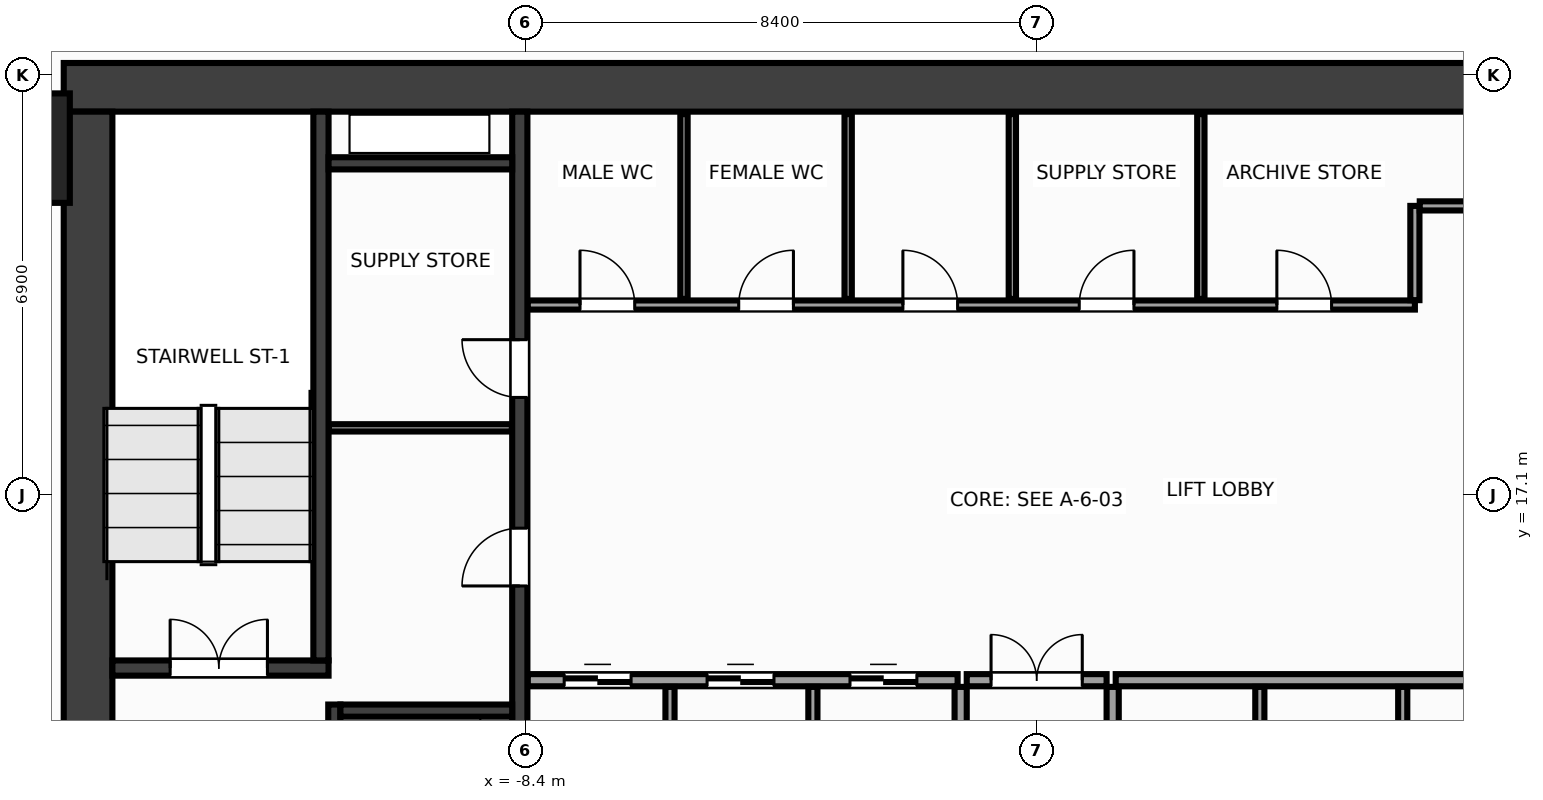
"""IFC4 building model, lengths in metres.
Left out: names, types, materials, properties, quantities, classifications, styles, units other than length and angle.
Written with IfcOpenShell. Run it as: python <this file> out.ifc"""

import sys

from ifc_helpers import new_model, si_unit, direction, frame, frame_2d, origin, origin_2d, place, context, subcontext, project, spatial, rectangle, extrude, source, transform, mapped, element, fill, save


model = new_model("IFC4")
c1 = context("Model", 3, precision=1e-05, world=origin(), true_north=direction((0.0, 1.0)))
c2 = subcontext(c1, "Body", "Model", "MODEL_VIEW")
j1 = project(units=[si_unit("LENGTHUNIT", "METRE"), si_unit("PLANEANGLEUNIT", "RADIAN")], contexts=[c1])
p1 = place(None, origin())
s1 = spatial("IfcSite", under=j1, at=p1, CompositionType="ELEMENT")
p2 = place(p1, origin())
s2 = spatial("IfcBuilding", under=s1, at=p2, CompositionType="ELEMENT")
p3 = place(p2, frame((0.0, 0.0, 56.0)))
s3 = spatial("IfcBuildingStorey", under=s2, at=p3, CompositionType="ELEMENT", Elevation=56.0)
m1 = source(origin(), c2, "Body", "SweptSolid", [
    extrude(rectangle(XDim=32.0, YDim=0.8, at=frame_2d((16.0, 0.0))), origin(), (0.0, 0.0, 1.0), 3.6),
])
p4 = place(p3, frame((-16.0, 23.8, 0.0), z_axis=(0.0, 0.0, 1.0), x_axis=(1.0, 0.0, 0.0)))
e1 = element("IfcWall", 1, at=p4, inside=s3, PredefinedType="SHEAR", context=c2, shape_type="MappedRepresentation", body=[
    mapped(m1, transform((0.0, 0.0, 0.0), x_axis=(1.0, 0.0, 0.0), y_axis=(0.0, 1.0, 0.0), z_axis=(0.0, 0.0, 1.0), scale=1.0)),
])
m2 = source(origin(), c2, "Body", "SweptSolid", [
    extrude(rectangle(XDim=12.8, YDim=0.8, at=frame_2d((6.4, 0.0))), origin(), (0.0, 0.0, 1.0), 3.6),
])
p5 = place(p3, frame((-15.6, 10.6, 0.0), z_axis=(0.0, 0.0, 1.0), x_axis=(0.0, 1.0, 0.0)))
e2 = element("IfcWall", 2, at=p5, inside=s3, PredefinedType="SHEAR", context=c2, shape_type="MappedRepresentation", body=[
    mapped(m2, transform((0.0, 0.0, 0.0), x_axis=(1.0, 0.0, 0.0), y_axis=(0.0, 1.0, 0.0), z_axis=(0.0, 0.0, 1.0), scale=1.0)),
])
m3 = source(origin(), c2, "Body", "SweptSolid", [
    extrude(rectangle(XDim=12.8, YDim=0.25, at=frame_2d((6.4, 0.0))), origin(), (0.0, 0.0, 1.0), 3.6),
])
p6 = place(p3, frame((-8.5, 10.6, 0.0), z_axis=(0.0, 0.0, 1.0), x_axis=(0.0, 1.0, 0.0)))
e3 = element("IfcWall", 3, at=p6, inside=s3, PredefinedType="SHEAR", context=c2, shape_type="MappedRepresentation", body=[
    mapped(m3, transform((0.0, 0.0, 0.0), x_axis=(1.0, 0.0, 0.0), y_axis=(0.0, 1.0, 0.0), z_axis=(0.0, 0.0, 1.0), scale=1.0)),
])
p7 = place(p6, frame((5.0, 0.0, 0.0)))
e4 = element("IfcOpeningElement", 4, at=p7, cuts=e3, PredefinedType="OPENING", context=c2, shape_type="SweptSolid", body=[
    extrude(rectangle(XDim=0.95, YDim=2.15, at=frame_2d((0.475, 1.075))), frame((0.0, 0.137, 0.0), z_axis=(0.0, -1.0, 0.0), x_axis=(1.0, 0.0, 0.0)), (0.0, 0.0, 1.0), 0.274),
])
p8 = place(p6, frame((8.1, 0.0, 0.0)))
e5 = element("IfcOpeningElement", 5, at=p8, cuts=e3, PredefinedType="OPENING", context=c2, shape_type="SweptSolid", body=[
    extrude(rectangle(XDim=0.95, YDim=2.15, at=frame_2d((0.475, 1.075))), frame((0.0, 0.137, 0.0), z_axis=(0.0, -1.0, 0.0), x_axis=(1.0, 0.0, 0.0)), (0.0, 0.0, 1.0), 0.274),
])
m4 = source(origin(), c2, "Body", "SweptSolid", [
    extrude(rectangle(XDim=3.555, YDim=0.25, at=frame_2d((1.777, 0.0))), origin(), (0.0, 0.0, 1.0), 3.6),
])
p9 = place(p3, frame((-15.2, 14.25, 0.0), z_axis=(0.0, 0.0, 1.0), x_axis=(1.0, 0.0, 0.0)))
e6 = element("IfcWall", 6, at=p9, inside=s3, PredefinedType="SHEAR", context=c2, shape_type="MappedRepresentation", body=[
    mapped(m4, transform((0.0, 0.0, 0.0), x_axis=(1.0, 0.0, 0.0), y_axis=(0.0, 1.0, 0.0), z_axis=(0.0, 0.0, 1.0), scale=1.0)),
])
p10 = place(p9, frame((0.95, 0.0, 0.0)))
e7 = element("IfcOpeningElement", 7, at=p10, cuts=e6, PredefinedType="OPENING", context=c2, shape_type="SweptSolid", body=[
    extrude(rectangle(XDim=1.6, YDim=2.15, at=frame_2d((0.8, 1.075))), frame((0.0, 0.137, 0.0), z_axis=(0.0, -1.0, 0.0), x_axis=(1.0, 0.0, 0.0)), (0.0, 0.0, 1.0), 0.274),
])
m5 = source(origin(), c2, "Body", "SweptSolid", [
    extrude(rectangle(XDim=9.025, YDim=0.25, at=frame_2d((4.512, 0.0))), origin(), (0.0, 0.0, 1.0), 3.6),
])
p11 = place(p3, frame((-11.77, 14.375, 0.0), z_axis=(0.0, 0.0, 1.0), x_axis=(0.0, 1.0, 0.0)))
e8 = element("IfcWall", 8, at=p11, inside=s3, PredefinedType="SHEAR", context=c2, shape_type="MappedRepresentation", body=[
    mapped(m5, transform((0.0, 0.0, 0.0), x_axis=(1.0, 0.0, 0.0), y_axis=(0.0, 1.0, 0.0), z_axis=(0.0, 0.0, 1.0), scale=1.0)),
])
m6 = source(origin(), c2, "Body", "SweptSolid", [
    extrude(rectangle(XDim=3.05, YDim=0.2, at=frame_2d((1.525, 0.0))), origin(), (0.0, 0.0, 1.0), 3.6),
])
p12 = place(p3, frame((-11.55, 10.6, 0.0), z_axis=(0.0, 0.0, 1.0), x_axis=(0.0, 1.0, 0.0)))
e9 = element("IfcWall", 9, at=p12, inside=s3, PredefinedType="SHEAR", context=c2, shape_type="MappedRepresentation", body=[
    mapped(m6, transform((0.0, 0.0, 0.0), x_axis=(1.0, 0.0, 0.0), y_axis=(0.0, 1.0, 0.0), z_axis=(0.0, 0.0, 1.0), scale=1.0)),
])
p13 = place(p12, frame((0.9, 0.0, 0.0)))
e10 = element("IfcOpeningElement", 10, at=p13, cuts=e9, PredefinedType="OPENING", context=c2, shape_type="SweptSolid", body=[
    extrude(rectangle(XDim=1.1, YDim=2.15, at=frame_2d((0.55, 1.075))), frame((0.0, 0.112, 0.0), z_axis=(0.0, -1.0, 0.0), x_axis=(1.0, 0.0, 0.0)), (0.0, 0.0, 1.0), 0.224),
])
m7 = source(origin(), c2, "Body", "SweptSolid", [
    extrude(rectangle(XDim=2.825, YDim=0.2, at=frame_2d((1.413, 0.0))), origin(), (0.0, 0.0, 1.0), 3.6),
])
p14 = place(p3, frame((-11.45, 13.55, 0.0), z_axis=(0.0, 0.0, 1.0), x_axis=(1.0, 0.0, 0.0)))
e11 = element("IfcWall", 11, at=p14, inside=s3, PredefinedType="SHEAR", context=c2, shape_type="MappedRepresentation", body=[
    mapped(m7, transform((0.0, 0.0, 0.0), x_axis=(1.0, 0.0, 0.0), y_axis=(0.0, 1.0, 0.0), z_axis=(0.0, 0.0, 1.0), scale=1.0)),
])
m8 = source(origin(), c2, "Body", "SweptSolid", [
    extrude(rectangle(XDim=3.02, YDim=0.2, at=frame_2d((1.51, 0.0))), origin(), (0.0, 0.0, 1.0), 3.6),
])
p15 = place(p3, frame((-11.645, 22.55, 0.0), z_axis=(0.0, 0.0, 1.0), x_axis=(1.0, 0.0, 0.0)))
e12 = element("IfcWall", 12, at=p15, inside=s3, PredefinedType="SHEAR", context=c2, shape_type="MappedRepresentation", body=[
    mapped(m8, transform((0.0, 0.0, 0.0), x_axis=(1.0, 0.0, 0.0), y_axis=(0.0, 1.0, 0.0), z_axis=(0.0, 0.0, 1.0), scale=1.0)),
])
m9 = source(origin(), c2, "Body", "SweptSolid", [
    extrude(rectangle(XDim=1.8, YDim=1.8, at=origin_2d()), origin(), (0.0, 0.0, 1.0), 3.6),
])
p16 = place(p3, frame((-16.8, 22.8, 0.0), z_axis=(0.0, 0.0, 1.0), x_axis=(1.0, 0.0, 0.0)))
e13 = element("IfcColumn", 13, at=p16, inside=s3, PredefinedType="COLUMN", context=c2, shape_type="MappedRepresentation", body=[
    mapped(m9, transform((0.0, 0.0, 0.0), x_axis=(1.0, 0.0, 0.0), y_axis=(0.0, 1.0, 0.0), z_axis=(0.0, 0.0, 1.0), scale=1.0)),
])
m10 = source(origin(), c2, "Body", "SweptSolid", [
    extrude(rectangle(XDim=3.01, YDim=0.12, at=frame_2d((1.505, 0.0))), origin(), (0.0, 0.0, 1.0), 3.36),
])
p17 = place(p3, frame((-11.64, 18.2, 0.0), z_axis=(0.0, 0.0, 1.0), x_axis=(1.0, 0.0, 0.0)))
e14 = element("IfcWall", 14, at=p17, inside=s3, PredefinedType="PARTITIONING", context=c2, shape_type="MappedRepresentation", body=[
    mapped(m10, transform((0.0, 0.0, 0.0), x_axis=(1.0, 0.0, 0.0), y_axis=(0.0, 1.0, 0.0), z_axis=(0.0, 0.0, 1.0), scale=1.0)),
])
m11 = source(origin(), c2, "Body", "SweptSolid", [
    extrude(rectangle(XDim=7.07, YDim=0.2, at=frame_2d((3.535, 0.0))), origin(), (0.0, 0.0, 1.0), 3.36),
])
p18 = place(p3, frame((-8.37, 14.05, 0.0), z_axis=(0.0, 0.0, 1.0), x_axis=(1.0, 0.0, 0.0)))
e15 = element("IfcWall", 15, at=p18, inside=s3, PredefinedType="PARTITIONING", context=c2, shape_type="MappedRepresentation", body=[
    mapped(m11, transform((0.0, 0.0, 0.0), x_axis=(1.0, 0.0, 0.0), y_axis=(0.0, 1.0, 0.0), z_axis=(0.0, 0.0, 1.0), scale=1.0)),
])
p19 = place(p18, frame((0.6, 0.0, 0.0)))
e16 = element("IfcOpeningElement", 16, at=p19, cuts=e15, PredefinedType="OPENING", context=c2, shape_type="SweptSolid", body=[
    extrude(rectangle(XDim=1.1, YDim=2.15, at=frame_2d((0.55, 1.075))), frame((0.0, 0.112, 0.0), z_axis=(0.0, -1.0, 0.0), x_axis=(1.0, 0.0, 0.0)), (0.0, 0.0, 1.0), 0.224),
])
p20 = place(p18, frame((2.95, 0.0, 0.0)))
e17 = element("IfcOpeningElement", 17, at=p20, cuts=e15, PredefinedType="OPENING", context=c2, shape_type="SweptSolid", body=[
    extrude(rectangle(XDim=1.1, YDim=2.15, at=frame_2d((0.55, 1.075))), frame((0.0, 0.112, 0.0), z_axis=(0.0, -1.0, 0.0), x_axis=(1.0, 0.0, 0.0)), (0.0, 0.0, 1.0), 0.224),
])
p21 = place(p18, frame((5.3, 0.0, 0.0)))
e18 = element("IfcOpeningElement", 18, at=p21, cuts=e15, PredefinedType="OPENING", context=c2, shape_type="SweptSolid", body=[
    extrude(rectangle(XDim=1.1, YDim=2.15, at=frame_2d((0.55, 1.075))), frame((0.0, 0.112, 0.0), z_axis=(0.0, -1.0, 0.0), x_axis=(1.0, 0.0, 0.0)), (0.0, 0.0, 1.0), 0.224),
])
p22 = place(p3, frame((1.3, 14.05, 0.0), z_axis=(0.0, 0.0, 1.0), x_axis=(1.0, 0.0, 0.0)))
e19 = element("IfcWall", 19, at=p22, inside=s3, PredefinedType="PARTITIONING", context=c2, shape_type="MappedRepresentation", body=[
    mapped(m11, transform((0.0, 0.0, 0.0), x_axis=(1.0, 0.0, 0.0), y_axis=(0.0, 1.0, 0.0), z_axis=(0.0, 0.0, 1.0), scale=1.0)),
])
m12 = source(origin(), c2, "Body", "SweptSolid", [
    extrude(rectangle(XDim=3.34, YDim=0.2, at=frame_2d((1.67, 0.0))), origin(), (0.0, 0.0, 1.0), 3.36),
])
for number, where, z_axis, x_axis in (
    (20, (-1.25, 10.6, 0.0), (0.0, 0.0, 1.0), (0.0, 1.0, 0.0)),
    (21, (1.25, 10.6, 0.0), (0.0, 0.0, 1.0), (0.0, 1.0, 0.0)),
):
    element("IfcWall", number, at=place(p3, frame(where, z_axis=z_axis, x_axis=x_axis)), inside=s3, PredefinedType="PARTITIONING", context=c2, shape_type="MappedRepresentation", body=[
        mapped(m12, transform((0.0, 0.0, 0.0), x_axis=(1.0, 0.0, 0.0), y_axis=(0.0, 1.0, 0.0), z_axis=(0.0, 0.0, 1.0), scale=1.0)),
    ])
m13 = source(origin(), c2, "Body", "SweptSolid", [
    extrude(rectangle(XDim=2.3, YDim=0.2, at=frame_2d((1.15, 0.0))), origin(), (0.0, 0.0, 1.0), 3.36),
])
p23 = place(p3, frame((-1.15, 14.05, 0.0), z_axis=(0.0, 0.0, 1.0), x_axis=(1.0, 0.0, 0.0)))
e22 = element("IfcWall", 22, at=p23, inside=s3, PredefinedType="PARTITIONING", context=c2, shape_type="MappedRepresentation", body=[
    mapped(m13, transform((0.0, 0.0, 0.0), x_axis=(1.0, 0.0, 0.0), y_axis=(0.0, 1.0, 0.0), z_axis=(0.0, 0.0, 1.0), scale=1.0)),
])
p24 = place(p23, frame((0.4, 0.0, 0.0)))
e23 = element("IfcOpeningElement", 23, at=p24, cuts=e22, PredefinedType="OPENING", context=c2, shape_type="SweptSolid", body=[
    extrude(rectangle(XDim=1.5, YDim=2.2, at=frame_2d((0.75, 1.1))), frame((0.0, 0.112, 0.0), z_axis=(0.0, -1.0, 0.0), x_axis=(1.0, 0.0, 0.0)), (0.0, 0.0, 1.0), 0.224),
])
m14 = source(origin(), c2, "Body", "SweptSolid", [
    extrude(rectangle(XDim=14.59, YDim=0.15, at=frame_2d((7.295, 0.0))), origin(), (0.0, 0.0, 1.0), 3.36),
])
p25 = place(p3, frame((-8.37, 20.22, 0.0), z_axis=(0.0, 0.0, 1.0), x_axis=(1.0, 0.0, 0.0)))
e24 = element("IfcWall", 24, at=p25, inside=s3, PredefinedType="PARTITIONING", context=c2, shape_type="MappedRepresentation", body=[
    mapped(m14, transform((0.0, 0.0, 0.0), x_axis=(1.0, 0.0, 0.0), y_axis=(0.0, 1.0, 0.0), z_axis=(0.0, 0.0, 1.0), scale=1.0)),
])
p26 = place(p25, frame((0.86, 0.0, 0.0)))
e25 = element("IfcOpeningElement", 25, at=p26, cuts=e24, PredefinedType="OPENING", context=c2, shape_type="SweptSolid", body=[
    extrude(rectangle(XDim=0.9, YDim=2.15, at=frame_2d((0.45, 1.075))), frame((0.0, 0.087, 0.0), z_axis=(0.0, -1.0, 0.0), x_axis=(1.0, 0.0, 0.0)), (0.0, 0.0, 1.0), 0.174),
])
p27 = place(p25, frame((3.47, 0.0, 0.0)))
e26 = element("IfcOpeningElement", 26, at=p27, cuts=e24, PredefinedType="OPENING", context=c2, shape_type="SweptSolid", body=[
    extrude(rectangle(XDim=0.9, YDim=2.15, at=frame_2d((0.45, 1.075))), frame((0.0, 0.087, 0.0), z_axis=(0.0, -1.0, 0.0), x_axis=(1.0, 0.0, 0.0)), (0.0, 0.0, 1.0), 0.174),
])
p28 = place(p25, frame((6.17, 0.0, 0.0)))
e27 = element("IfcOpeningElement", 27, at=p28, cuts=e24, PredefinedType="OPENING", context=c2, shape_type="SweptSolid", body=[
    extrude(rectangle(XDim=0.9, YDim=2.15, at=frame_2d((0.45, 1.075))), frame((0.0, 0.087, 0.0), z_axis=(0.0, -1.0, 0.0), x_axis=(1.0, 0.0, 0.0)), (0.0, 0.0, 1.0), 0.174),
])
p29 = place(p25, frame((9.07, 0.0, 0.0)))
e28 = element("IfcOpeningElement", 28, at=p29, cuts=e24, PredefinedType="OPENING", context=c2, shape_type="SweptSolid", body=[
    extrude(rectangle(XDim=0.9, YDim=2.15, at=frame_2d((0.45, 1.075))), frame((0.0, 0.087, 0.0), z_axis=(0.0, -1.0, 0.0), x_axis=(1.0, 0.0, 0.0)), (0.0, 0.0, 1.0), 0.174),
])
p30 = place(p25, frame((12.32, 0.0, 0.0)))
e29 = element("IfcOpeningElement", 29, at=p30, cuts=e24, PredefinedType="OPENING", context=c2, shape_type="SweptSolid", body=[
    extrude(rectangle(XDim=0.9, YDim=2.15, at=frame_2d((0.45, 1.075))), frame((0.0, 0.087, 0.0), z_axis=(0.0, -1.0, 0.0), x_axis=(1.0, 0.0, 0.0)), (0.0, 0.0, 1.0), 0.174),
])
m15 = source(origin(), c2, "Body", "SweptSolid", [
    extrude(rectangle(XDim=1.55, YDim=0.15, at=frame_2d((0.775, 0.0))), origin(), (0.0, 0.0, 1.0), 3.36),
])
p31 = place(p3, frame((6.22, 20.3, 0.0), z_axis=(0.0, 0.0, 1.0), x_axis=(0.0, 1.0, 0.0)))
e30 = element("IfcWall", 30, at=p31, inside=s3, PredefinedType="PARTITIONING", context=c2, shape_type="MappedRepresentation", body=[
    mapped(m15, transform((0.0, 0.0, 0.0), x_axis=(1.0, 0.0, 0.0), y_axis=(0.0, 1.0, 0.0), z_axis=(0.0, 0.0, 1.0), scale=1.0)),
])
m16 = source(origin(), c2, "Body", "SweptSolid", [
    extrude(rectangle(XDim=2.07, YDim=0.15, at=frame_2d((1.035, 0.0))), origin(), (0.0, 0.0, 1.0), 3.36),
])
p32 = place(p3, frame((6.3, 21.85, 0.0), z_axis=(0.0, 0.0, 1.0), x_axis=(1.0, 0.0, 0.0)))
e31 = element("IfcWall", 31, at=p32, inside=s3, PredefinedType="PARTITIONING", context=c2, shape_type="MappedRepresentation", body=[
    mapped(m16, transform((0.0, 0.0, 0.0), x_axis=(1.0, 0.0, 0.0), y_axis=(0.0, 1.0, 0.0), z_axis=(0.0, 0.0, 1.0), scale=1.0)),
])
m17 = source(origin(), c2, "Body", "SweptSolid", [
    extrude(rectangle(XDim=3.34, YDim=0.15, at=frame_2d((1.67, 0.0))), origin(), (0.0, 0.0, 1.0), 3.36),
])
for number, where, z_axis, x_axis in (
    (32, (-6.03, 10.6, 0.0), (0.0, 0.0, 1.0), (0.0, 1.0, 0.0)),
    (33, (-3.68, 10.6, 0.0), (0.0, 0.0, 1.0), (0.0, 1.0, 0.0)),
    (34, (3.67, 10.6, 0.0), (0.0, 0.0, 1.0), (0.0, 1.0, 0.0)),
    (35, (6.02, 10.6, 0.0), (0.0, 0.0, 1.0), (0.0, 1.0, 0.0)),
):
    element("IfcWall", number, at=place(p3, frame(where, z_axis=z_axis, x_axis=x_axis)), inside=s3, PredefinedType="PARTITIONING", context=c2, shape_type="MappedRepresentation", body=[
        mapped(m17, transform((0.0, 0.0, 0.0), x_axis=(1.0, 0.0, 0.0), y_axis=(0.0, 1.0, 0.0), z_axis=(0.0, 0.0, 1.0), scale=1.0)),
    ])
m18 = source(origin(), c2, "Body", "SweptSolid", [
    extrude(rectangle(XDim=3.04, YDim=0.12, at=frame_2d((1.52, 0.0))), origin(), (0.0, 0.0, 1.0), 3.36),
])
for number, where, z_axis, x_axis in (
    (36, (-5.8, 20.32, 0.0), (0.0, 0.0, 1.0), (0.0, 1.0, 0.0)),
    (37, (-3.1, 20.32, 0.0), (0.0, 0.0, 1.0), (0.0, 1.0, 0.0)),
    (38, (-0.4, 20.32, 0.0), (0.0, 0.0, 1.0), (0.0, 1.0, 0.0)),
    (39, (2.7, 20.32, 0.0), (0.0, 0.0, 1.0), (0.0, 1.0, 0.0)),
):
    element("IfcWall", number, at=place(p3, frame(where, z_axis=z_axis, x_axis=x_axis)), inside=s3, PredefinedType="PARTITIONING", context=c2, shape_type="MappedRepresentation", body=[
        mapped(m18, transform((0.0, 0.0, 0.0), x_axis=(1.0, 0.0, 0.0), y_axis=(0.0, 1.0, 0.0), z_axis=(0.0, 0.0, 1.0), scale=1.0)),
    ])
m19 = source(origin(), c2, "Body", "SweptSolid", [
    extrude(rectangle(XDim=1.6, YDim=2.15, at=frame_2d((0.8, 1.075))), frame((0.0, 0.025, 0.0), z_axis=(0.0, -1.0, 0.0), x_axis=(1.0, 0.0, 0.0)), (0.0, 0.0, 1.0), 0.05),
])
p33 = place(p10, origin())
e40 = element("IfcDoor", 40, at=p33, inside=s3, OperationType="DOUBLE_DOOR_SINGLE_SWING", PredefinedType="DOOR", context=c2, shape_type="MappedRepresentation", body=[
    mapped(m19, transform((0.0, 0.0, 0.0), x_axis=(1.0, 0.0, 0.0), y_axis=(0.0, 1.0, 0.0), z_axis=(0.0, 0.0, 1.0), scale=1.0)),
])
fill(e7, e40)
m20 = source(origin(), c2, "Body", "SweptSolid", [
    extrude(rectangle(XDim=0.95, YDim=2.15, at=frame_2d((0.475, 1.075))), frame((0.0, 0.025, 0.0), z_axis=(0.0, -1.0, 0.0), x_axis=(1.0, 0.0, 0.0)), (0.0, 0.0, 1.0), 0.05),
])
p34 = place(p7, origin())
e41 = element("IfcDoor", 41, at=p34, inside=s3, OperationType="SINGLE_SWING_LEFT", PredefinedType="DOOR", context=c2, shape_type="MappedRepresentation", body=[
    mapped(m20, transform((0.0, 0.0, 0.0), x_axis=(1.0, 0.0, 0.0), y_axis=(0.0, 1.0, 0.0), z_axis=(0.0, 0.0, 1.0), scale=1.0)),
])
fill(e4, e41)
p35 = place(p8, origin())
e42 = element("IfcDoor", 42, at=p35, inside=s3, OperationType="SINGLE_SWING_RIGHT", PredefinedType="DOOR", context=c2, shape_type="MappedRepresentation", body=[
    mapped(m20, transform((0.0, 0.0, 0.0), x_axis=(1.0, 0.0, 0.0), y_axis=(0.0, 1.0, 0.0), z_axis=(0.0, 0.0, 1.0), scale=1.0)),
])
fill(e5, e42)
m21 = source(origin(), c2, "Body", "SweptSolid", [
    extrude(rectangle(XDim=1.1, YDim=2.15, at=frame_2d((0.55, 1.075))), frame((0.0, 0.025, 0.0), z_axis=(0.0, -1.0, 0.0), x_axis=(1.0, 0.0, 0.0)), (0.0, 0.0, 1.0), 0.05),
])
p36 = place(p19, origin())
e43 = element("IfcDoor", 43, at=p36, inside=s3, OperationType="DOUBLE_DOOR_SLIDING", PredefinedType="DOOR", context=c2, shape_type="MappedRepresentation", body=[
    mapped(m21, transform((0.0, 0.0, 0.0), x_axis=(1.0, 0.0, 0.0), y_axis=(0.0, 1.0, 0.0), z_axis=(0.0, 0.0, 1.0), scale=1.0)),
])
fill(e16, e43)
p37 = place(p20, origin())
e44 = element("IfcDoor", 44, at=p37, inside=s3, OperationType="DOUBLE_DOOR_SLIDING", PredefinedType="DOOR", context=c2, shape_type="MappedRepresentation", body=[
    mapped(m21, transform((0.0, 0.0, 0.0), x_axis=(1.0, 0.0, 0.0), y_axis=(0.0, 1.0, 0.0), z_axis=(0.0, 0.0, 1.0), scale=1.0)),
])
fill(e17, e44)
p38 = place(p21, origin())
e45 = element("IfcDoor", 45, at=p38, inside=s3, OperationType="DOUBLE_DOOR_SLIDING", PredefinedType="DOOR", context=c2, shape_type="MappedRepresentation", body=[
    mapped(m21, transform((0.0, 0.0, 0.0), x_axis=(1.0, 0.0, 0.0), y_axis=(0.0, 1.0, 0.0), z_axis=(0.0, 0.0, 1.0), scale=1.0)),
])
fill(e18, e45)
m22 = source(origin(), c2, "Body", "SweptSolid", [
    extrude(rectangle(XDim=1.5, YDim=2.2, at=frame_2d((0.75, 1.1))), frame((0.0, 0.025, 0.0), z_axis=(0.0, -1.0, 0.0), x_axis=(1.0, 0.0, 0.0)), (0.0, 0.0, 1.0), 0.05),
])
p39 = place(p24, origin())
e46 = element("IfcDoor", 46, at=p39, inside=s3, OperationType="DOUBLE_DOOR_SINGLE_SWING", PredefinedType="DOOR", context=c2, shape_type="MappedRepresentation", body=[
    mapped(m22, transform((0.0, 0.0, 0.0), x_axis=(1.0, 0.0, 0.0), y_axis=(0.0, 1.0, 0.0), z_axis=(0.0, 0.0, 1.0), scale=1.0)),
])
fill(e23, e46)
m23 = source(origin(), c2, "Body", "SweptSolid", [
    extrude(rectangle(XDim=0.9, YDim=2.15, at=frame_2d((0.45, 1.075))), frame((0.0, 0.025, 0.0), z_axis=(0.0, -1.0, 0.0), x_axis=(1.0, 0.0, 0.0)), (0.0, 0.0, 1.0), 0.05),
])
p40 = place(p26, origin())
e47 = element("IfcDoor", 47, at=p40, inside=s3, OperationType="SINGLE_SWING_LEFT", PredefinedType="DOOR", context=c2, shape_type="MappedRepresentation", body=[
    mapped(m23, transform((0.0, 0.0, 0.0), x_axis=(1.0, 0.0, 0.0), y_axis=(0.0, 1.0, 0.0), z_axis=(0.0, 0.0, 1.0), scale=1.0)),
])
fill(e25, e47)
p41 = place(p27, origin())
e48 = element("IfcDoor", 48, at=p41, inside=s3, OperationType="SINGLE_SWING_RIGHT", PredefinedType="DOOR", context=c2, shape_type="MappedRepresentation", body=[
    mapped(m23, transform((0.0, 0.0, 0.0), x_axis=(1.0, 0.0, 0.0), y_axis=(0.0, 1.0, 0.0), z_axis=(0.0, 0.0, 1.0), scale=1.0)),
])
fill(e26, e48)
p42 = place(p28, origin())
e49 = element("IfcDoor", 49, at=p42, inside=s3, OperationType="SINGLE_SWING_LEFT", PredefinedType="DOOR", context=c2, shape_type="MappedRepresentation", body=[
    mapped(m23, transform((0.0, 0.0, 0.0), x_axis=(1.0, 0.0, 0.0), y_axis=(0.0, 1.0, 0.0), z_axis=(0.0, 0.0, 1.0), scale=1.0)),
])
fill(e27, e49)
p43 = place(p29, origin())
e50 = element("IfcDoor", 50, at=p43, inside=s3, OperationType="SINGLE_SWING_RIGHT", PredefinedType="DOOR", context=c2, shape_type="MappedRepresentation", body=[
    mapped(m23, transform((0.0, 0.0, 0.0), x_axis=(1.0, 0.0, 0.0), y_axis=(0.0, 1.0, 0.0), z_axis=(0.0, 0.0, 1.0), scale=1.0)),
])
fill(e28, e50)
p44 = place(p30, origin())
e51 = element("IfcDoor", 51, at=p44, inside=s3, OperationType="SINGLE_SWING_LEFT", PredefinedType="DOOR", context=c2, shape_type="MappedRepresentation", body=[
    mapped(m23, transform((0.0, 0.0, 0.0), x_axis=(1.0, 0.0, 0.0), y_axis=(0.0, 1.0, 0.0), z_axis=(0.0, 0.0, 1.0), scale=1.0)),
])
fill(e29, e51)
save(model, sys.argv[1])
